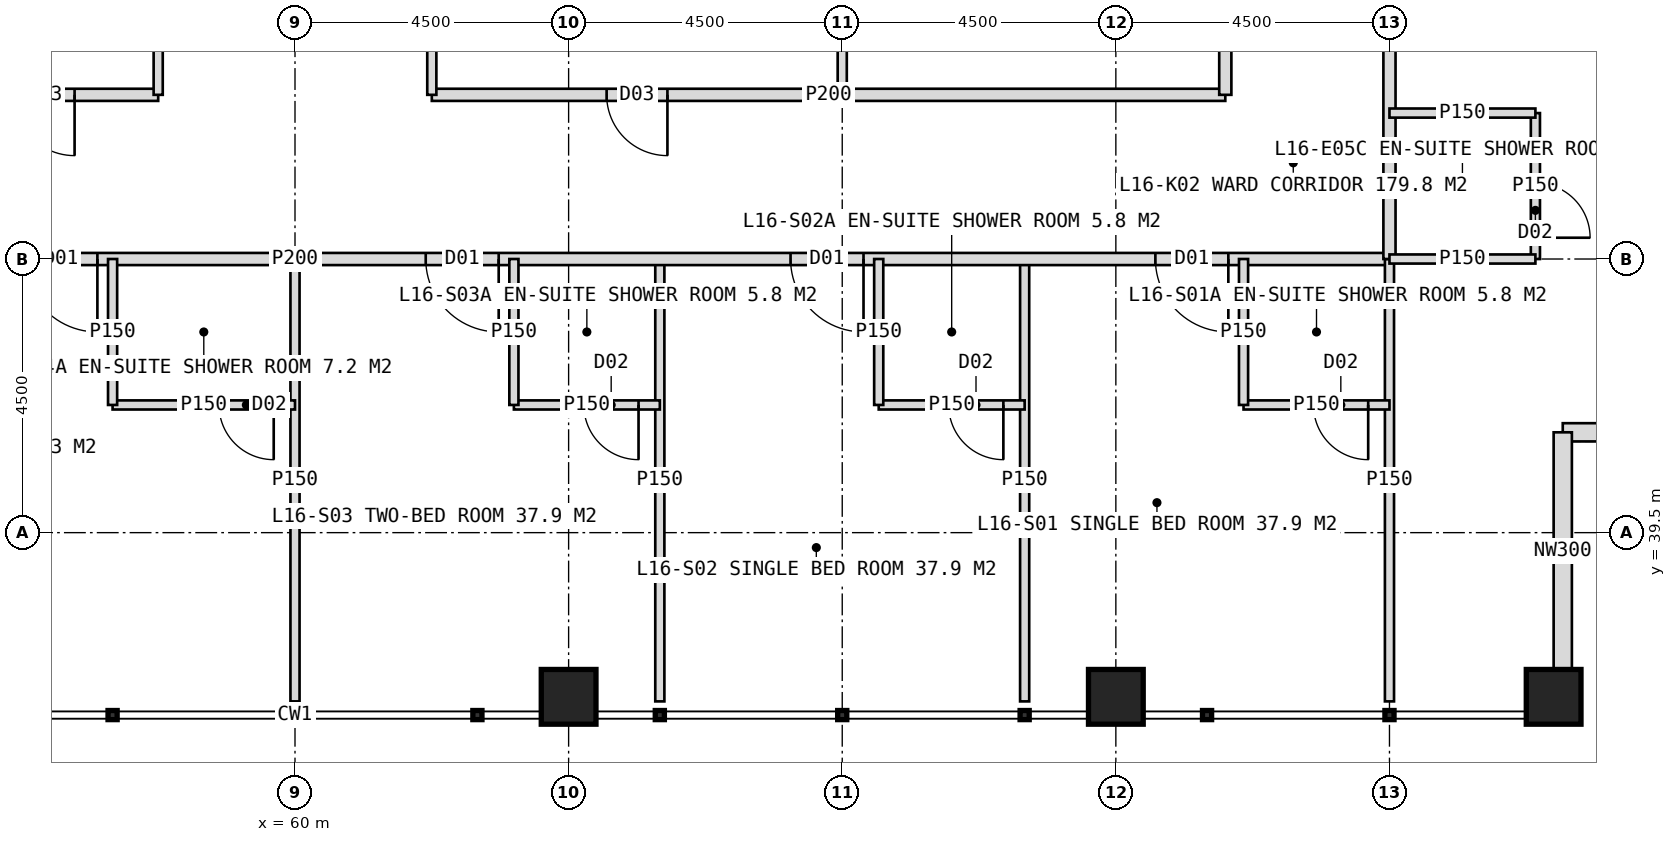
"""IFC4 building model, lengths in metres.
Left out: names, types, materials, properties, quantities, classifications, styles, units other than length and angle.
Written with IfcOpenShell. Run it as: python <this file> out.ifc"""

import sys

from ifc_helpers import new_model, si_unit, direction, frame, frame_2d, origin, origin_2d, place, context, subcontext, project, spatial, rectangle, hollow_rectangle, extrude, element, fill, save


model = new_model("IFC4")
c1 = context("Model", 3, precision=1e-05, world=origin(), true_north=direction((0.0, 1.0)))
c2 = subcontext(c1, "Body", "Model", "MODEL_VIEW")
j1 = project(units=[si_unit("LENGTHUNIT", "METRE"), si_unit("PLANEANGLEUNIT", "RADIAN")], contexts=[c1])
p1 = place(None, origin())
s1 = spatial("IfcSite", under=j1, at=p1, CompositionType="ELEMENT")
p2 = place(p1, origin())
s2 = spatial("IfcBuilding", under=s1, at=p2, CompositionType="ELEMENT")
p3 = place(p2, frame((0.0, 0.0, 71.0)))
s3 = spatial("IfcBuildingStorey", under=s2, at=p3, CompositionType="ELEMENT", Elevation=71.0)
for number, where, z_axis, x_axis in (
    (1, (64.5, 36.8, 0.0), (0.0, 0.0, 1.0), (1.0, 0.0, 0.0)),
    (2, (73.5, 36.8, 0.0), (0.0, 0.0, 1.0), (1.0, 0.0, 0.0)),
    (3, (80.7, 36.8, 0.0), (0.0, 0.0, 1.0), (1.0, 0.0, 0.0)),
):
    element("IfcColumn", number, at=place(p3, frame(where, z_axis=z_axis, x_axis=x_axis)), inside=s3, PredefinedType="COLUMN", context=c2, shape_type="SweptSolid", body=[
        extrude(hollow_rectangle(XDim=0.9, YDim=0.9, WallThickness=0.08, at=origin_2d()), origin(), (0.0, 0.0, 1.0), 4.0),
    ])
for number, where, z_axis, x_axis in (
    (4, (84.75, 41.15, 0.0), (0.0, 0.0, 1.0), (-1.0, 0.0, 0.0)),
    (5, (80.85, 41.15, 0.0), (0.0, 0.0, 1.0), (0.0, -1.0, 0.0)),
):
    element("IfcWall", number, at=place(p3, frame(where, z_axis=z_axis, x_axis=x_axis)), inside=s3, PredefinedType="ELEMENTEDWALL", context=c2, shape_type="SweptSolid", body=[
        extrude(rectangle(XDim=3.9, YDim=0.3, at=frame_2d((1.95, 0.0))), origin(), (0.0, 0.0, 1.0), 2.95),
    ])
for number, where, z_axis, x_axis in (
    (6, (72.0, 44.0, 0.0), (0.0, 0.0, 1.0), (0.0, -1.0, 0.0)),
    (7, (66.0, 44.0, 0.0), (0.0, 0.0, 1.0), (0.0, -1.0, 0.0)),
):
    element("IfcWall", number, at=place(p3, frame(where, z_axis=z_axis, x_axis=x_axis)), inside=s3, PredefinedType="PARTITIONING", context=c2, shape_type="SweptSolid", body=[
        extrude(rectangle(XDim=7.275, YDim=0.15, at=frame_2d((3.637, 0.0))), origin(), (0.0, 0.0, 1.0), 3.75),
    ])
p4 = place(p3, frame((60.0, 44.0, 0.0), z_axis=(0.0, 0.0, 1.0), x_axis=(0.0, -1.0, 0.0)))
e8 = element("IfcWall", 8, at=p4, inside=s3, PredefinedType="PARTITIONING", context=c2, shape_type="SweptSolid", body=[
    extrude(rectangle(XDim=7.275, YDim=0.15, at=frame_2d((3.637, 0.0))), origin(), (0.0, 0.0, 1.0), 2.75),
])
p5 = place(p3, frame((78.0, 44.0, 0.0), z_axis=(0.0, 0.0, 1.0), x_axis=(-1.0, 0.0, 0.0)))
e9 = element("IfcWall", 9, at=p5, inside=s3, PredefinedType="PARTITIONING", context=c2, shape_type="SweptSolid", body=[
    extrude(rectangle(XDim=36.0, YDim=0.2, at=frame_2d((18.0, 0.0))), origin(), (0.0, 0.0, 1.0), 3.75),
])
p6 = place(p5, frame((2.65, 0.0, 0.0)))
e10 = element("IfcOpeningElement", 10, at=p6, cuts=e9, PredefinedType="OPENING", context=c2, shape_type="SweptSolid", body=[
    extrude(rectangle(XDim=1.2, YDim=2.2, at=frame_2d((0.6, 1.1))), frame((0.0, 0.11, 0.0), z_axis=(0.0, -1.0, 0.0), x_axis=(1.0, 0.0, 0.0)), (0.0, 0.0, 1.0), 0.22),
])
p7 = place(p5, frame((8.65, 0.0, 0.0)))
e11 = element("IfcOpeningElement", 11, at=p7, cuts=e9, PredefinedType="OPENING", context=c2, shape_type="SweptSolid", body=[
    extrude(rectangle(XDim=1.2, YDim=2.2, at=frame_2d((0.6, 1.1))), frame((0.0, 0.11, 0.0), z_axis=(0.0, -1.0, 0.0), x_axis=(1.0, 0.0, 0.0)), (0.0, 0.0, 1.0), 0.22),
])
p8 = place(p5, frame((14.65, 0.0, 0.0)))
e12 = element("IfcOpeningElement", 12, at=p8, cuts=e9, PredefinedType="OPENING", context=c2, shape_type="SweptSolid", body=[
    extrude(rectangle(XDim=1.2, YDim=2.2, at=frame_2d((0.6, 1.1))), frame((0.0, 0.11, 0.0), z_axis=(0.0, -1.0, 0.0), x_axis=(1.0, 0.0, 0.0)), (0.0, 0.0, 1.0), 0.22),
])
p9 = place(p5, frame((21.25, 0.0, 0.0)))
e13 = element("IfcOpeningElement", 13, at=p9, cuts=e9, PredefinedType="OPENING", context=c2, shape_type="SweptSolid", body=[
    extrude(rectangle(XDim=1.2, YDim=2.2, at=frame_2d((0.6, 1.1))), frame((0.0, 0.11, 0.0), z_axis=(0.0, -1.0, 0.0), x_axis=(1.0, 0.0, 0.0)), (0.0, 0.0, 1.0), 0.22),
])
p10 = place(p5, frame((29.65, 0.0, 0.0)))
e14 = element("IfcOpeningElement", 14, at=p10, cuts=e9, PredefinedType="OPENING", context=c2, shape_type="SweptSolid", body=[
    extrude(rectangle(XDim=1.2, YDim=2.2, at=frame_2d((0.6, 1.1))), frame((0.0, 0.11, 0.0), z_axis=(0.0, -1.0, 0.0), x_axis=(1.0, 0.0, 0.0)), (0.0, 0.0, 1.0), 0.22),
])
p11 = place(p3, frame((78.0, 44.0, 0.0), z_axis=(0.0, 0.0, 1.0), x_axis=(0.0, -1.0, 0.0)))
e15 = element("IfcWall", 15, at=p11, inside=s3, PredefinedType="PARTITIONING", context=c2, shape_type="SweptSolid", body=[
    extrude(rectangle(XDim=7.275, YDim=0.15, at=frame_2d((3.637, 0.0))), origin(), (0.0, 0.0, 1.0), 3.75),
])
p12 = place(p3, frame((78.0, 41.6, 0.0), z_axis=(0.0, 0.0, 1.0), x_axis=(-1.0, 0.0, 0.0)))
e16 = element("IfcWall", 16, at=p12, inside=s3, PredefinedType="PARTITIONING", context=c2, shape_type="SweptSolid", body=[
    extrude(rectangle(XDim=2.4, YDim=0.15, at=frame_2d((1.2, 0.0))), origin(), (0.0, 0.0, 1.0), 3.75),
])
p13 = place(p12, frame((0.35, 0.0, 0.0)))
e17 = element("IfcOpeningElement", 17, at=p13, cuts=e16, PredefinedType="OPENING", context=c2, shape_type="SweptSolid", body=[
    extrude(rectangle(XDim=0.9, YDim=2.1, at=frame_2d((0.45, 1.05))), frame((0.0, 0.085, 0.0), z_axis=(0.0, -1.0, 0.0), x_axis=(1.0, 0.0, 0.0)), (0.0, 0.0, 1.0), 0.17),
])
p14 = place(p3, frame((75.6, 44.0, 0.0), z_axis=(0.0, 0.0, 1.0), x_axis=(0.0, -1.0, 0.0)))
e18 = element("IfcWall", 18, at=p14, inside=s3, PredefinedType="PARTITIONING", context=c2, shape_type="SweptSolid", body=[
    extrude(rectangle(XDim=2.4, YDim=0.15, at=frame_2d((1.2, 0.0))), origin(), (0.0, 0.0, 1.0), 3.75),
])
p15 = place(p3, frame((72.0, 41.6, 0.0), z_axis=(0.0, 0.0, 1.0), x_axis=(-1.0, 0.0, 0.0)))
e19 = element("IfcWall", 19, at=p15, inside=s3, PredefinedType="PARTITIONING", context=c2, shape_type="SweptSolid", body=[
    extrude(rectangle(XDim=2.4, YDim=0.15, at=frame_2d((1.2, 0.0))), origin(), (0.0, 0.0, 1.0), 3.75),
])
p16 = place(p15, frame((0.35, 0.0, 0.0)))
e20 = element("IfcOpeningElement", 20, at=p16, cuts=e19, PredefinedType="OPENING", context=c2, shape_type="SweptSolid", body=[
    extrude(rectangle(XDim=0.9, YDim=2.1, at=frame_2d((0.45, 1.05))), frame((0.0, 0.085, 0.0), z_axis=(0.0, -1.0, 0.0), x_axis=(1.0, 0.0, 0.0)), (0.0, 0.0, 1.0), 0.17),
])
p17 = place(p3, frame((69.6, 44.0, 0.0), z_axis=(0.0, 0.0, 1.0), x_axis=(0.0, -1.0, 0.0)))
e21 = element("IfcWall", 21, at=p17, inside=s3, PredefinedType="PARTITIONING", context=c2, shape_type="SweptSolid", body=[
    extrude(rectangle(XDim=2.4, YDim=0.15, at=frame_2d((1.2, 0.0))), origin(), (0.0, 0.0, 1.0), 3.75),
])
p18 = place(p3, frame((66.0, 41.6, 0.0), z_axis=(0.0, 0.0, 1.0), x_axis=(-1.0, 0.0, 0.0)))
e22 = element("IfcWall", 22, at=p18, inside=s3, PredefinedType="PARTITIONING", context=c2, shape_type="SweptSolid", body=[
    extrude(rectangle(XDim=2.4, YDim=0.15, at=frame_2d((1.2, 0.0))), origin(), (0.0, 0.0, 1.0), 3.75),
])
p19 = place(p18, frame((0.35, 0.0, 0.0)))
e23 = element("IfcOpeningElement", 23, at=p19, cuts=e22, PredefinedType="OPENING", context=c2, shape_type="SweptSolid", body=[
    extrude(rectangle(XDim=0.9, YDim=2.1, at=frame_2d((0.45, 1.05))), frame((0.0, 0.085, 0.0), z_axis=(0.0, -1.0, 0.0), x_axis=(1.0, 0.0, 0.0)), (0.0, 0.0, 1.0), 0.17),
])
p20 = place(p3, frame((63.6, 44.0, 0.0), z_axis=(0.0, 0.0, 1.0), x_axis=(0.0, -1.0, 0.0)))
e24 = element("IfcWall", 24, at=p20, inside=s3, PredefinedType="PARTITIONING", context=c2, shape_type="SweptSolid", body=[
    extrude(rectangle(XDim=2.4, YDim=0.15, at=frame_2d((1.2, 0.0))), origin(), (0.0, 0.0, 1.0), 3.75),
])
p21 = place(p3, frame((60.0, 41.6, 0.0), z_axis=(0.0, 0.0, 1.0), x_axis=(-1.0, 0.0, 0.0)))
e25 = element("IfcWall", 25, at=p21, inside=s3, PredefinedType="PARTITIONING", context=c2, shape_type="SweptSolid", body=[
    extrude(rectangle(XDim=3.0, YDim=0.15, at=frame_2d((1.5, 0.0))), origin(), (0.0, 0.0, 1.0), 3.75),
])
p22 = place(p21, frame((0.35, 0.0, 0.0)))
e26 = element("IfcOpeningElement", 26, at=p22, cuts=e25, PredefinedType="OPENING", context=c2, shape_type="SweptSolid", body=[
    extrude(rectangle(XDim=0.9, YDim=2.1, at=frame_2d((0.45, 1.05))), frame((0.0, 0.085, 0.0), z_axis=(0.0, -1.0, 0.0), x_axis=(1.0, 0.0, 0.0)), (0.0, 0.0, 1.0), 0.17),
])
p23 = place(p3, frame((57.0, 44.0, 0.0), z_axis=(0.0, 0.0, 1.0), x_axis=(0.0, -1.0, 0.0)))
e27 = element("IfcWall", 27, at=p23, inside=s3, PredefinedType="PARTITIONING", context=c2, shape_type="SweptSolid", body=[
    extrude(rectangle(XDim=2.4, YDim=0.15, at=frame_2d((1.2, 0.0))), origin(), (0.0, 0.0, 1.0), 3.75),
])
p24 = place(p3, frame((69.0, 53.0, 0.0), z_axis=(0.0, 0.0, 1.0), x_axis=(0.0, -1.0, 0.0)))
e28 = element("IfcWall", 28, at=p24, inside=s3, PredefinedType="PARTITIONING", context=c2, shape_type="SweptSolid", body=[
    extrude(rectangle(XDim=6.3, YDim=0.15, at=frame_2d((3.15, 0.0))), origin(), (0.0, 0.0, 1.0), 3.75),
])
p25 = place(p3, frame((75.3, 46.7, 0.0), z_axis=(0.0, 0.0, 1.0), x_axis=(-1.0, 0.0, 0.0)))
e29 = element("IfcWall", 29, at=p25, inside=s3, PredefinedType="PARTITIONING", context=c2, shape_type="SweptSolid", body=[
    extrude(rectangle(XDim=13.05, YDim=0.2, at=frame_2d((6.525, 0.0))), origin(), (0.0, 0.0, 1.0), 3.75),
])
p26 = place(p25, frame((9.175, 0.0, 0.0)))
e30 = element("IfcOpeningElement", 30, at=p26, cuts=e29, PredefinedType="OPENING", context=c2, shape_type="SweptSolid", body=[
    extrude(rectangle(XDim=1.0, YDim=2.1, at=frame_2d((0.5, 1.05))), frame((0.0, 0.11, 0.0), z_axis=(0.0, -1.0, 0.0), x_axis=(1.0, 0.0, 0.0)), (0.0, 0.0, 1.0), 0.22),
])
p27 = place(p3, frame((57.75, 46.7, 0.0), z_axis=(0.0, 0.0, 1.0), x_axis=(-1.0, 0.0, 0.0)))
e31 = element("IfcWall", 31, at=p27, inside=s3, PredefinedType="PARTITIONING", context=c2, shape_type="SweptSolid", body=[
    extrude(rectangle(XDim=13.05, YDim=0.2, at=frame_2d((6.525, 0.0))), origin(), (0.0, 0.0, 1.0), 3.75),
])
p28 = place(p27, frame((1.375, 0.0, 0.0)))
e32 = element("IfcOpeningElement", 32, at=p28, cuts=e31, PredefinedType="OPENING", context=c2, shape_type="SweptSolid", body=[
    extrude(rectangle(XDim=1.0, YDim=2.1, at=frame_2d((0.5, 1.05))), frame((0.0, 0.11, 0.0), z_axis=(0.0, -1.0, 0.0), x_axis=(1.0, 0.0, 0.0)), (0.0, 0.0, 1.0), 0.22),
])
p29 = place(p27, frame((5.5, 0.0, 0.0)))
e33 = element("IfcOpeningElement", 33, at=p29, cuts=e31, PredefinedType="OPENING", context=c2, shape_type="SweptSolid", body=[
    extrude(rectangle(XDim=1.0, YDim=2.1, at=frame_2d((0.5, 1.05))), frame((0.0, 0.11, 0.0), z_axis=(0.0, -1.0, 0.0), x_axis=(1.0, 0.0, 0.0)), (0.0, 0.0, 1.0), 0.22),
])
p30 = place(p27, frame((10.15, 0.0, 0.0)))
e34 = element("IfcOpeningElement", 34, at=p30, cuts=e31, PredefinedType="OPENING", context=c2, shape_type="SweptSolid", body=[
    extrude(rectangle(XDim=1.0, YDim=2.1, at=frame_2d((0.5, 1.05))), frame((0.0, 0.11, 0.0), z_axis=(0.0, -1.0, 0.0), x_axis=(1.0, 0.0, 0.0)), (0.0, 0.0, 1.0), 0.22),
])
for number, where, z_axis, x_axis in (
    (35, (62.25, 53.0, 0.0), (0.0, 0.0, 1.0), (0.0, -1.0, 0.0)),
    (36, (57.75, 53.0, 0.0), (0.0, 0.0, 1.0), (0.0, -1.0, 0.0)),
):
    element("IfcWall", number, at=place(p3, frame(where, z_axis=z_axis, x_axis=x_axis)), inside=s3, PredefinedType="PARTITIONING", context=c2, shape_type="SweptSolid", body=[
        extrude(rectangle(XDim=6.3, YDim=0.15, at=frame_2d((3.15, 0.0))), origin(), (0.0, 0.0, 1.0), 3.75),
    ])
p31 = place(p3, frame((78.0, 80.0, 0.0), z_axis=(0.0, 0.0, 1.0), x_axis=(0.0, -1.0, 0.0)))
e37 = element("IfcWall", 37, at=p31, inside=s3, PredefinedType="PARTITIONING", context=c2, shape_type="SweptSolid", body=[
    extrude(rectangle(XDim=36.0, YDim=0.2, at=frame_2d((18.0, 0.0))), origin(), (0.0, 0.0, 1.0), 3.75),
])
p32 = place(p31, frame((2.65, 0.0, 0.0)))
e38 = element("IfcOpeningElement", 38, at=p32, cuts=e37, PredefinedType="OPENING", context=c2, shape_type="SweptSolid", body=[
    extrude(rectangle(XDim=1.2, YDim=2.2, at=frame_2d((0.6, 1.1))), frame((0.0, 0.11, 0.0), z_axis=(0.0, -1.0, 0.0), x_axis=(1.0, 0.0, 0.0)), (0.0, 0.0, 1.0), 0.22),
])
p33 = place(p31, frame((8.65, 0.0, 0.0)))
e39 = element("IfcOpeningElement", 39, at=p33, cuts=e37, PredefinedType="OPENING", context=c2, shape_type="SweptSolid", body=[
    extrude(rectangle(XDim=1.2, YDim=2.2, at=frame_2d((0.6, 1.1))), frame((0.0, 0.11, 0.0), z_axis=(0.0, -1.0, 0.0), x_axis=(1.0, 0.0, 0.0)), (0.0, 0.0, 1.0), 0.22),
])
p34 = place(p31, frame((14.65, 0.0, 0.0)))
e40 = element("IfcOpeningElement", 40, at=p34, cuts=e37, PredefinedType="OPENING", context=c2, shape_type="SweptSolid", body=[
    extrude(rectangle(XDim=1.2, YDim=2.2, at=frame_2d((0.6, 1.1))), frame((0.0, 0.11, 0.0), z_axis=(0.0, -1.0, 0.0), x_axis=(1.0, 0.0, 0.0)), (0.0, 0.0, 1.0), 0.22),
])
p35 = place(p31, frame((21.25, 0.0, 0.0)))
e41 = element("IfcOpeningElement", 41, at=p35, cuts=e37, PredefinedType="OPENING", context=c2, shape_type="SweptSolid", body=[
    extrude(rectangle(XDim=1.2, YDim=2.2, at=frame_2d((0.6, 1.1))), frame((0.0, 0.11, 0.0), z_axis=(0.0, -1.0, 0.0), x_axis=(1.0, 0.0, 0.0)), (0.0, 0.0, 1.0), 0.22),
])
p36 = place(p31, frame((29.65, 0.0, 0.0)))
e42 = element("IfcOpeningElement", 42, at=p36, cuts=e37, PredefinedType="OPENING", context=c2, shape_type="SweptSolid", body=[
    extrude(rectangle(XDim=1.2, YDim=2.2, at=frame_2d((0.6, 1.1))), frame((0.0, 0.11, 0.0), z_axis=(0.0, -1.0, 0.0), x_axis=(1.0, 0.0, 0.0)), (0.0, 0.0, 1.0), 0.22),
])
p37 = place(p3, frame((80.4, 46.4, 0.0), z_axis=(0.0, 0.0, 1.0), x_axis=(0.0, -1.0, 0.0)))
e43 = element("IfcWall", 43, at=p37, inside=s3, PredefinedType="PARTITIONING", context=c2, shape_type="SweptSolid", body=[
    extrude(rectangle(XDim=2.4, YDim=0.15, at=frame_2d((1.2, 0.0))), origin(), (0.0, 0.0, 1.0), 3.75),
])
p38 = place(p37, frame((1.15, 0.0, 0.0)))
e44 = element("IfcOpeningElement", 44, at=p38, cuts=e43, PredefinedType="OPENING", context=c2, shape_type="SweptSolid", body=[
    extrude(rectangle(XDim=0.9, YDim=2.1, at=frame_2d((0.45, 1.05))), frame((0.0, 0.085, 0.0), z_axis=(0.0, -1.0, 0.0), x_axis=(1.0, 0.0, 0.0)), (0.0, 0.0, 1.0), 0.17),
])
for number, where, z_axis, x_axis in (
    (45, (78.0, 46.4, 0.0), (0.0, 0.0, 1.0), (1.0, 0.0, 0.0)),
    (46, (78.0, 44.0, 0.0), (0.0, 0.0, 1.0), (1.0, 0.0, 0.0)),
):
    element("IfcWall", number, at=place(p3, frame(where, z_axis=z_axis, x_axis=x_axis)), inside=s3, PredefinedType="PARTITIONING", context=c2, shape_type="SweptSolid", body=[
        extrude(rectangle(XDim=2.4, YDim=0.15, at=frame_2d((1.2, 0.0))), origin(), (0.0, 0.0, 1.0), 3.75),
    ])
p39 = place(p3, frame((75.3, 62.0, 0.0), z_axis=(0.0, 0.0, 1.0), x_axis=(0.0, -1.0, 0.0)))
e47 = element("IfcWall", 47, at=p39, inside=s3, PredefinedType="PARTITIONING", context=c2, shape_type="SweptSolid", body=[
    extrude(rectangle(XDim=15.3, YDim=0.2, at=frame_2d((7.65, 0.0))), origin(), (0.0, 0.0, 1.0), 3.75),
])
p40 = place(p39, frame((3.25, 0.0, 0.0)))
e48 = element("IfcOpeningElement", 48, at=p40, cuts=e47, PredefinedType="OPENING", context=c2, shape_type="SweptSolid", body=[
    extrude(rectangle(XDim=1.0, YDim=2.1, at=frame_2d((0.5, 1.05))), frame((0.0, 0.11, 0.0), z_axis=(0.0, -1.0, 0.0), x_axis=(1.0, 0.0, 0.0)), (0.0, 0.0, 1.0), 0.22),
])
p41 = place(p39, frame((10.9, 0.0, 0.0)))
e49 = element("IfcOpeningElement", 49, at=p41, cuts=e47, PredefinedType="OPENING", context=c2, shape_type="SweptSolid", body=[
    extrude(rectangle(XDim=1.0, YDim=2.1, at=frame_2d((0.5, 1.05))), frame((0.0, 0.11, 0.0), z_axis=(0.0, -1.0, 0.0), x_axis=(1.0, 0.0, 0.0)), (0.0, 0.0, 1.0), 0.22),
])
p42 = place(p6, origin())
e50 = element("IfcDoor", 50, at=p42, inside=s3, OperationType="SINGLE_SWING_LEFT", PredefinedType="DOOR", context=c2, shape_type="SweptSolid", body=[
    extrude(rectangle(XDim=1.2, YDim=2.2, at=frame_2d((0.6, 1.1))), frame((0.0, 0.025, 0.0), z_axis=(0.0, -1.0, 0.0), x_axis=(1.0, 0.0, 0.0)), (0.0, 0.0, 1.0), 0.05),
])
fill(e10, e50)
p43 = place(p13, origin())
e51 = element("IfcDoor", 51, at=p43, inside=s3, OperationType="SINGLE_SWING_LEFT", PredefinedType="DOOR", context=c2, shape_type="SweptSolid", body=[
    extrude(rectangle(XDim=0.9, YDim=2.1, at=frame_2d((0.45, 1.05))), frame((0.0, 0.025, 0.0), z_axis=(0.0, -1.0, 0.0), x_axis=(1.0, 0.0, 0.0)), (0.0, 0.0, 1.0), 0.05),
])
fill(e17, e51)
p44 = place(p7, origin())
e52 = element("IfcDoor", 52, at=p44, inside=s3, OperationType="SINGLE_SWING_LEFT", PredefinedType="DOOR", context=c2, shape_type="SweptSolid", body=[
    extrude(rectangle(XDim=1.2, YDim=2.2, at=frame_2d((0.6, 1.1))), frame((0.0, 0.025, 0.0), z_axis=(0.0, -1.0, 0.0), x_axis=(1.0, 0.0, 0.0)), (0.0, 0.0, 1.0), 0.05),
])
fill(e11, e52)
p45 = place(p16, origin())
e53 = element("IfcDoor", 53, at=p45, inside=s3, OperationType="SINGLE_SWING_LEFT", PredefinedType="DOOR", context=c2, shape_type="SweptSolid", body=[
    extrude(rectangle(XDim=0.9, YDim=2.1, at=frame_2d((0.45, 1.05))), frame((0.0, 0.025, 0.0), z_axis=(0.0, -1.0, 0.0), x_axis=(1.0, 0.0, 0.0)), (0.0, 0.0, 1.0), 0.05),
])
fill(e20, e53)
p46 = place(p8, origin())
e54 = element("IfcDoor", 54, at=p46, inside=s3, OperationType="SINGLE_SWING_LEFT", PredefinedType="DOOR", context=c2, shape_type="SweptSolid", body=[
    extrude(rectangle(XDim=1.2, YDim=2.2, at=frame_2d((0.6, 1.1))), frame((0.0, 0.025, 0.0), z_axis=(0.0, -1.0, 0.0), x_axis=(1.0, 0.0, 0.0)), (0.0, 0.0, 1.0), 0.05),
])
fill(e12, e54)
p47 = place(p19, origin())
e55 = element("IfcDoor", 55, at=p47, inside=s3, OperationType="SINGLE_SWING_LEFT", PredefinedType="DOOR", context=c2, shape_type="SweptSolid", body=[
    extrude(rectangle(XDim=0.9, YDim=2.1, at=frame_2d((0.45, 1.05))), frame((0.0, 0.025, 0.0), z_axis=(0.0, -1.0, 0.0), x_axis=(1.0, 0.0, 0.0)), (0.0, 0.0, 1.0), 0.05),
])
fill(e23, e55)
p48 = place(p9, origin())
e56 = element("IfcDoor", 56, at=p48, inside=s3, OperationType="SINGLE_SWING_LEFT", PredefinedType="DOOR", context=c2, shape_type="SweptSolid", body=[
    extrude(rectangle(XDim=1.2, YDim=2.2, at=frame_2d((0.6, 1.1))), frame((0.0, 0.025, 0.0), z_axis=(0.0, -1.0, 0.0), x_axis=(1.0, 0.0, 0.0)), (0.0, 0.0, 1.0), 0.05),
])
fill(e13, e56)
p49 = place(p22, origin())
e57 = element("IfcDoor", 57, at=p49, inside=s3, OperationType="SINGLE_SWING_LEFT", PredefinedType="DOOR", context=c2, shape_type="SweptSolid", body=[
    extrude(rectangle(XDim=0.9, YDim=2.1, at=frame_2d((0.45, 1.05))), frame((0.0, 0.025, 0.0), z_axis=(0.0, -1.0, 0.0), x_axis=(1.0, 0.0, 0.0)), (0.0, 0.0, 1.0), 0.05),
])
fill(e26, e57)
p50 = place(p26, origin())
e58 = element("IfcDoor", 58, at=p50, inside=s3, OperationType="SINGLE_SWING_LEFT", PredefinedType="DOOR", context=c2, shape_type="SweptSolid", body=[
    extrude(rectangle(XDim=1.0, YDim=2.1, at=frame_2d((0.5, 1.05))), frame((0.0, 0.025, 0.0), z_axis=(0.0, -1.0, 0.0), x_axis=(1.0, 0.0, 0.0)), (0.0, 0.0, 1.0), 0.05),
])
fill(e30, e58)
p51 = place(p28, origin())
e59 = element("IfcDoor", 59, at=p51, inside=s3, OperationType="SINGLE_SWING_LEFT", PredefinedType="DOOR", context=c2, shape_type="SweptSolid", body=[
    extrude(rectangle(XDim=1.0, YDim=2.1, at=frame_2d((0.5, 1.05))), frame((0.0, 0.025, 0.0), z_axis=(0.0, -1.0, 0.0), x_axis=(1.0, 0.0, 0.0)), (0.0, 0.0, 1.0), 0.05),
])
fill(e32, e59)
p52 = place(p38, origin())
e60 = element("IfcDoor", 60, at=p52, inside=s3, OperationType="SINGLE_SWING_RIGHT", PredefinedType="DOOR", context=c2, shape_type="SweptSolid", body=[
    extrude(rectangle(XDim=0.9, YDim=2.1, at=frame_2d((0.45, 1.05))), frame((0.0, 0.025, 0.0), z_axis=(0.0, -1.0, 0.0), x_axis=(1.0, 0.0, 0.0)), (0.0, 0.0, 1.0), 0.05),
])
fill(e44, e60)
save(model, sys.argv[1])
